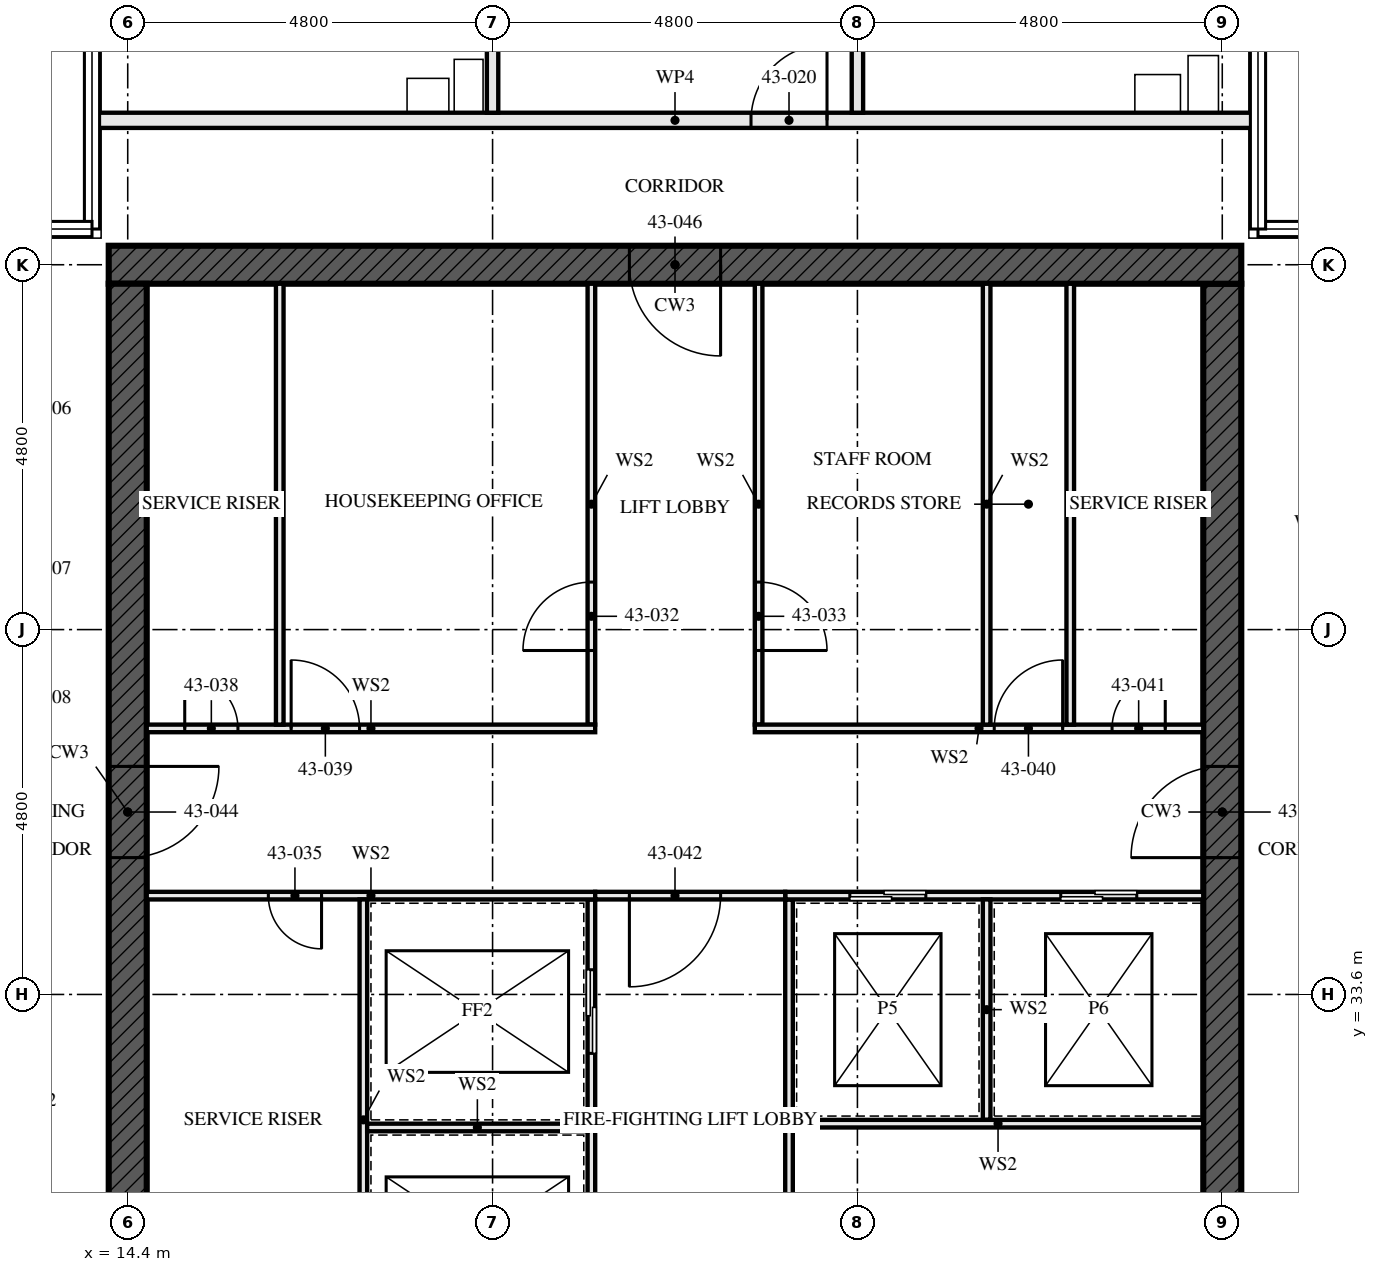
"""IFC4 building model, lengths in metres.
Left out: names, types, materials, properties, quantities, classifications, styles, units other than length and angle.
Written with IfcOpenShell. Run it as: python <this file> out.ifc"""

import sys

from ifc_helpers import new_model, si_unit, direction, frame, frame_2d, origin, place, context, subcontext, project, spatial, rectangle, extrude, element, fill, save


model = new_model("IFC4")
c1 = context("Model", 3, precision=1e-05, world=origin(), true_north=direction((0.0, 1.0)))
c2 = subcontext(c1, "Body", "Model", "MODEL_VIEW")
j1 = project(units=[si_unit("LENGTHUNIT", "METRE"), si_unit("PLANEANGLEUNIT", "RADIAN")], contexts=[c1])
p1 = place(None, origin())
s1 = spatial("IfcSite", under=j1, at=p1, CompositionType="ELEMENT")
p2 = place(p1, origin())
s2 = spatial("IfcBuilding", under=s1, at=p2, CompositionType="ELEMENT")
p3 = place(p2, frame((0.0, 0.0, 158.5)))
s3 = spatial("IfcBuildingStorey", under=s2, at=p3, CompositionType="ELEMENT", Elevation=158.5)
p4 = place(p3, frame((29.05, 43.2, -0.17), z_axis=(0.0, 0.0, 1.0), x_axis=(-1.0, 0.0, 0.0)))
e1 = element("IfcWall", 1, at=p4, inside=s3, PredefinedType="SHEAR", context=c2, shape_type="SweptSolid", body=[
    extrude(rectangle(XDim=14.9, YDim=0.5, at=frame_2d((7.45, 0.0))), origin(), (0.0, 0.0, 1.0), 3.5),
])
p5 = place(p4, frame((6.85, 0.0, 0.17)))
e2 = element("IfcOpeningElement", 2, at=p5, cuts=e1, PredefinedType="OPENING", context=c2, shape_type="SweptSolid", body=[
    extrude(rectangle(XDim=1.2, YDim=2.1, at=frame_2d((0.6, 1.05))), frame((0.0, 0.26, 0.0), z_axis=(0.0, -1.0, 0.0), x_axis=(1.0, 0.0, 0.0)), (0.0, 0.0, 1.0), 0.521),
])
p6 = place(p3, frame((14.4, 42.95, -0.17), z_axis=(0.0, 0.0, 1.0), x_axis=(0.0, -1.0, 0.0)))
e3 = element("IfcWall", 3, at=p6, inside=s3, PredefinedType="SHEAR", context=c2, shape_type="SweptSolid", body=[
    extrude(rectangle(XDim=13.9, YDim=0.5, at=frame_2d((6.95, 0.0))), origin(), (0.0, 0.0, 1.0), 3.5),
])
p7 = place(p6, frame((6.35, 0.0, 0.17)))
e4 = element("IfcOpeningElement", 4, at=p7, cuts=e3, PredefinedType="OPENING", context=c2, shape_type="SweptSolid", body=[
    extrude(rectangle(XDim=1.2, YDim=2.1, at=frame_2d((0.6, 1.05))), frame((0.0, 0.26, 0.0), z_axis=(0.0, -1.0, 0.0), x_axis=(1.0, 0.0, 0.0)), (0.0, 0.0, 1.0), 0.521),
])
p8 = place(p3, frame((28.8, 29.05, -0.17), z_axis=(0.0, 0.0, 1.0), x_axis=(0.0, 1.0, 0.0)))
e5 = element("IfcWall", 5, at=p8, inside=s3, PredefinedType="SHEAR", context=c2, shape_type="SweptSolid", body=[
    extrude(rectangle(XDim=13.9, YDim=0.5, at=frame_2d((6.95, 0.0))), origin(), (0.0, 0.0, 1.0), 3.5),
])
p9 = place(p8, frame((6.35, 0.0, 0.17)))
e6 = element("IfcOpeningElement", 6, at=p9, cuts=e5, PredefinedType="OPENING", context=c2, shape_type="SweptSolid", body=[
    extrude(rectangle(XDim=1.2, YDim=2.1, at=frame_2d((0.6, 1.05))), frame((0.0, 0.26, 0.0), z_axis=(0.0, -1.0, 0.0), x_axis=(1.0, 0.0, 0.0)), (0.0, 0.0, 1.0), 0.521),
])
p10 = place(p3, frame((24.0, 48.2, 0.0), z_axis=(0.0, 0.0, 1.0), x_axis=(0.0, -1.0, 0.0)))
e7 = element("IfcWall", 7, at=p10, inside=s3, PredefinedType="PARTITIONING", context=c2, shape_type="SweptSolid", body=[
    extrude(rectangle(XDim=3.0, YDim=0.15, at=frame_2d((1.5, 0.0))), origin(), (0.0, 0.0, 1.0), 2.55),
])
p11 = place(p10, frame((1.05, 0.0, 0.0)))
e8 = element("IfcOpeningElement", 8, at=p11, cuts=e7, PredefinedType="OPENING", context=c2, shape_type="SweptSolid", body=[
    extrude(rectangle(XDim=0.9, YDim=2.1, at=frame_2d((0.45, 1.05))), frame((0.0, 0.085, 0.0), z_axis=(0.0, -1.0, 0.0), x_axis=(1.0, 0.0, 0.0)), (0.0, 0.0, 1.0), 0.171),
])
p12 = place(p3, frame((19.2, 48.2, 0.0), z_axis=(0.0, 0.0, 1.0), x_axis=(0.0, -1.0, 0.0)))
e9 = element("IfcWall", 9, at=p12, inside=s3, PredefinedType="PARTITIONING", context=c2, shape_type="SweptSolid", body=[
    extrude(rectangle(XDim=3.0, YDim=0.15, at=frame_2d((1.5, 0.0))), origin(), (0.0, 0.0, 1.0), 2.55),
])
p13 = place(p12, frame((1.05, 0.0, 0.0)))
e10 = element("IfcOpeningElement", 10, at=p13, cuts=e9, PredefinedType="OPENING", context=c2, shape_type="SweptSolid", body=[
    extrude(rectangle(XDim=0.9, YDim=2.1, at=frame_2d((0.45, 1.05))), frame((0.0, 0.085, 0.0), z_axis=(0.0, -1.0, 0.0), x_axis=(1.0, 0.0, 0.0)), (0.0, 0.0, 1.0), 0.171),
])
p14 = place(p3, frame((29.25, 45.1, 0.0), z_axis=(0.0, 0.0, 1.0), x_axis=(-1.0, 0.0, 0.0)))
e11 = element("IfcWall", 11, at=p14, inside=s3, PredefinedType="PARTITIONING", context=c2, shape_type="SweptSolid", body=[
    extrude(rectangle(XDim=15.3, YDim=0.2, at=frame_2d((7.65, 0.0))), origin(), (0.0, 0.0, 1.0), 2.32),
])
p15 = place(p14, frame((5.65, 0.0, 0.0)))
e12 = element("IfcOpeningElement", 12, at=p15, cuts=e11, PredefinedType="OPENING", context=c2, shape_type="SweptSolid", body=[
    extrude(rectangle(XDim=1.0, YDim=2.1, at=frame_2d((0.5, 1.05))), frame((0.0, 0.111, 0.0), z_axis=(0.0, -1.0, 0.0), x_axis=(1.0, 0.0, 0.0)), (0.0, 0.0, 1.0), 0.221),
])
for number, where, z_axis, x_axis in (
    (13, (16.4, 37.15, 0.0), (0.0, 0.0, 1.0), (0.0, 1.0, 0.0)),
    (14, (26.8, 37.15, 0.0), (0.0, 0.0, 1.0), (0.0, 1.0, 0.0)),
):
    element("IfcWall", number, at=place(p3, frame(where, z_axis=z_axis, x_axis=x_axis)), inside=s3, PredefinedType="SOLIDWALL", context=c2, shape_type="SweptSolid", body=[
        extrude(rectangle(XDim=5.8, YDim=0.1, at=frame_2d((2.9, 0.0))), origin(), (0.0, 0.0, 1.0), 3.33),
    ])
p16 = place(p3, frame((20.5, 29.05, 0.0), z_axis=(0.0, 0.0, 1.0), x_axis=(0.0, 1.0, 0.0)))
e15 = element("IfcWall", 15, at=p16, inside=s3, PredefinedType="SOLIDWALL", context=c2, shape_type="SweptSolid", body=[
    extrude(rectangle(XDim=5.8, YDim=0.1, at=frame_2d((2.9, 0.0))), origin(), (0.0, 0.0, 1.0), 3.33),
])
p17 = place(p16, frame((0.8, 0.0, 0.0)))
e16 = element("IfcOpeningElement", 16, at=p17, cuts=e15, PredefinedType="OPENING", context=c2, shape_type="SweptSolid", body=[
    extrude(rectangle(XDim=1.1, YDim=2.3, at=frame_2d((0.55, 1.15))), frame((0.0, 0.061, 0.0), z_axis=(0.0, -1.0, 0.0), x_axis=(1.0, 0.0, 0.0)), (0.0, 0.0, 1.0), 0.121),
])
p18 = place(p16, frame((3.775, 0.0, 0.0)))
e17 = element("IfcOpeningElement", 17, at=p18, cuts=e15, PredefinedType="OPENING", context=c2, shape_type="SweptSolid", body=[
    extrude(rectangle(XDim=1.1, YDim=2.3, at=frame_2d((0.55, 1.15))), frame((0.0, 0.061, 0.0), z_axis=(0.0, -1.0, 0.0), x_axis=(1.0, 0.0, 0.0)), (0.0, 0.0, 1.0), 0.121),
])
p19 = place(p3, frame((20.5, 37.15, 0.0), z_axis=(0.0, 0.0, 1.0), x_axis=(0.0, 1.0, 0.0)))
e18 = element("IfcWall", 18, at=p19, inside=s3, PredefinedType="SOLIDWALL", context=c2, shape_type="SweptSolid", body=[
    extrude(rectangle(XDim=5.8, YDim=0.1, at=frame_2d((2.9, 0.0))), origin(), (0.0, 0.0, 1.0), 3.33),
])
p20 = place(p19, frame((0.975, 0.0, 0.0)))
e19 = element("IfcOpeningElement", 19, at=p20, cuts=e18, PredefinedType="OPENING", context=c2, shape_type="SweptSolid", body=[
    extrude(rectangle(XDim=0.9, YDim=2.1, at=frame_2d((0.45, 1.05))), frame((0.0, 0.061, 0.0), z_axis=(0.0, -1.0, 0.0), x_axis=(1.0, 0.0, 0.0)), (0.0, 0.0, 1.0), 0.121),
])
p21 = place(p3, frame((22.7, 37.15, 0.0), z_axis=(0.0, 0.0, 1.0), x_axis=(0.0, 1.0, 0.0)))
e20 = element("IfcWall", 20, at=p21, inside=s3, PredefinedType="SOLIDWALL", context=c2, shape_type="SweptSolid", body=[
    extrude(rectangle(XDim=5.8, YDim=0.1, at=frame_2d((2.9, 0.0))), origin(), (0.0, 0.0, 1.0), 3.33),
])
p22 = place(p21, frame((0.975, 0.0, 0.0)))
e21 = element("IfcOpeningElement", 21, at=p22, cuts=e20, PredefinedType="OPENING", context=c2, shape_type="SweptSolid", body=[
    extrude(rectangle(XDim=0.9, YDim=2.1, at=frame_2d((0.45, 1.05))), frame((0.0, 0.061, 0.0), z_axis=(0.0, -1.0, 0.0), x_axis=(1.0, 0.0, 0.0)), (0.0, 0.0, 1.0), 0.121),
])
p23 = place(p3, frame((23.1, 29.05, 0.0), z_axis=(0.0, 0.0, 1.0), x_axis=(0.0, 1.0, 0.0)))
e22 = element("IfcWall", 22, at=p23, inside=s3, PredefinedType="SOLIDWALL", context=c2, shape_type="SweptSolid", body=[
    extrude(rectangle(XDim=5.8, YDim=0.1, at=frame_2d((2.9, 0.0))), origin(), (0.0, 0.0, 1.0), 3.33),
])
p24 = place(p23, frame((1.0, 0.0, 0.0)))
e23 = element("IfcOpeningElement", 23, at=p24, cuts=e22, PredefinedType="OPENING", context=c2, shape_type="SweptSolid", body=[
    extrude(rectangle(XDim=0.7, YDim=2.1, at=frame_2d((0.35, 1.05))), frame((0.0, 0.061, 0.0), z_axis=(0.0, -1.0, 0.0), x_axis=(1.0, 0.0, 0.0)), (0.0, 0.0, 1.0), 0.121),
])
p25 = place(p3, frame((14.65, 34.9, 0.0), z_axis=(0.0, 0.0, 1.0), x_axis=(1.0, 0.0, 0.0)))
e24 = element("IfcWall", 24, at=p25, inside=s3, PredefinedType="SOLIDWALL", context=c2, shape_type="SweptSolid", body=[
    extrude(rectangle(XDim=5.9, YDim=0.1, at=frame_2d((2.95, 0.0))), origin(), (0.0, 0.0, 1.0), 3.33),
])
p26 = place(p25, frame((1.6, 0.0, 0.0)))
e25 = element("IfcOpeningElement", 25, at=p26, cuts=e24, PredefinedType="OPENING", context=c2, shape_type="SweptSolid", body=[
    extrude(rectangle(XDim=0.7, YDim=2.1, at=frame_2d((0.35, 1.05))), frame((0.0, 0.061, 0.0), z_axis=(0.0, -1.0, 0.0), x_axis=(1.0, 0.0, 0.0)), (0.0, 0.0, 1.0), 0.121),
])
p27 = place(p3, frame((23.05, 34.9, 0.0), z_axis=(0.0, 0.0, 1.0), x_axis=(1.0, 0.0, 0.0)))
e26 = element("IfcWall", 26, at=p27, inside=s3, PredefinedType="SOLIDWALL", context=c2, shape_type="SweptSolid", body=[
    extrude(rectangle(XDim=5.5, YDim=0.1, at=frame_2d((2.75, 0.0))), origin(), (0.0, 0.0, 1.0), 3.33),
])
p28 = place(p27, frame((0.85, 0.0, 0.0)))
e27 = element("IfcOpeningElement", 27, at=p28, cuts=e26, PredefinedType="OPENING", context=c2, shape_type="SweptSolid", body=[
    extrude(rectangle(XDim=1.0, YDim=2.1, at=frame_2d((0.5, 1.05))), frame((0.0, 0.061, 0.0), z_axis=(0.0, -1.0, 0.0), x_axis=(1.0, 0.0, 0.0)), (0.0, 0.0, 1.0), 0.121),
])
p29 = place(p27, frame((3.625, 0.0, 0.0)))
e28 = element("IfcOpeningElement", 28, at=p29, cuts=e26, PredefinedType="OPENING", context=c2, shape_type="SweptSolid", body=[
    extrude(rectangle(XDim=1.0, YDim=2.1, at=frame_2d((0.5, 1.05))), frame((0.0, 0.061, 0.0), z_axis=(0.0, -1.0, 0.0), x_axis=(1.0, 0.0, 0.0)), (0.0, 0.0, 1.0), 0.121),
])
p30 = place(p3, frame((14.65, 37.1, 0.0), z_axis=(0.0, 0.0, 1.0), x_axis=(1.0, 0.0, 0.0)))
e29 = element("IfcWall", 29, at=p30, inside=s3, PredefinedType="SOLIDWALL", context=c2, shape_type="SweptSolid", body=[
    extrude(rectangle(XDim=5.9, YDim=0.1, at=frame_2d((2.95, 0.0))), origin(), (0.0, 0.0, 1.0), 3.33),
])
p31 = place(p30, frame((0.5, 0.0, 0.0)))
e30 = element("IfcOpeningElement", 30, at=p31, cuts=e29, PredefinedType="OPENING", context=c2, shape_type="SweptSolid", body=[
    extrude(rectangle(XDim=0.7, YDim=2.1, at=frame_2d((0.35, 1.05))), frame((0.0, 0.061, 0.0), z_axis=(0.0, -1.0, 0.0), x_axis=(1.0, 0.0, 0.0)), (0.0, 0.0, 1.0), 0.121),
])
p32 = place(p30, frame((1.9, 0.0, 0.0)))
e31 = element("IfcOpeningElement", 31, at=p32, cuts=e29, PredefinedType="OPENING", context=c2, shape_type="SweptSolid", body=[
    extrude(rectangle(XDim=0.9, YDim=2.1, at=frame_2d((0.45, 1.05))), frame((0.0, 0.061, 0.0), z_axis=(0.0, -1.0, 0.0), x_axis=(1.0, 0.0, 0.0)), (0.0, 0.0, 1.0), 0.121),
])
p33 = place(p3, frame((22.65, 37.1, 0.0), z_axis=(0.0, 0.0, 1.0), x_axis=(1.0, 0.0, 0.0)))
e32 = element("IfcWall", 32, at=p33, inside=s3, PredefinedType="SOLIDWALL", context=c2, shape_type="SweptSolid", body=[
    extrude(rectangle(XDim=5.9, YDim=0.1, at=frame_2d((2.95, 0.0))), origin(), (0.0, 0.0, 1.0), 3.33),
])
p34 = place(p33, frame((3.15, 0.0, 0.0)))
e33 = element("IfcOpeningElement", 33, at=p34, cuts=e32, PredefinedType="OPENING", context=c2, shape_type="SweptSolid", body=[
    extrude(rectangle(XDim=0.9, YDim=2.1, at=frame_2d((0.45, 1.05))), frame((0.0, 0.061, 0.0), z_axis=(0.0, -1.0, 0.0), x_axis=(1.0, 0.0, 0.0)), (0.0, 0.0, 1.0), 0.121),
])
p35 = place(p33, frame((4.7, 0.0, 0.0)))
e34 = element("IfcOpeningElement", 34, at=p35, cuts=e32, PredefinedType="OPENING", context=c2, shape_type="SweptSolid", body=[
    extrude(rectangle(XDim=0.7, YDim=2.1, at=frame_2d((0.35, 1.05))), frame((0.0, 0.061, 0.0), z_axis=(0.0, -1.0, 0.0), x_axis=(1.0, 0.0, 0.0)), (0.0, 0.0, 1.0), 0.121),
])
p36 = place(p3, frame((20.55, 34.9, 0.0), z_axis=(0.0, 0.0, 1.0), x_axis=(1.0, 0.0, 0.0)))
e35 = element("IfcWall", 35, at=p36, inside=s3, PredefinedType="SOLIDWALL", context=c2, shape_type="SweptSolid", body=[
    extrude(rectangle(XDim=2.5, YDim=0.1, at=frame_2d((1.25, 0.0))), origin(), (0.0, 0.0, 1.0), 3.33),
])
p37 = place(p36, frame((0.45, 0.0, 0.0)))
e36 = element("IfcOpeningElement", 36, at=p37, cuts=e35, PredefinedType="OPENING", context=c2, shape_type="SweptSolid", body=[
    extrude(rectangle(XDim=1.2, YDim=2.1, at=frame_2d((0.6, 1.05))), frame((0.0, 0.061, 0.0), z_axis=(0.0, -1.0, 0.0), x_axis=(1.0, 0.0, 0.0)), (0.0, 0.0, 1.0), 0.121),
])
p38 = place(p3, frame((17.5, 29.05, 0.0), z_axis=(0.0, 0.0, 1.0), x_axis=(0.0, 1.0, 0.0)))
e37 = element("IfcWall", 37, at=p38, inside=s3, PredefinedType="SOLIDWALL", context=c2, shape_type="SweptSolid", body=[
    extrude(rectangle(XDim=5.8, YDim=0.1, at=frame_2d((2.9, 0.0))), origin(), (0.0, 0.0, 1.0), 3.33),
])
p39 = place(p3, frame((17.55, 31.85, 0.0), z_axis=(0.0, 0.0, 1.0), x_axis=(1.0, 0.0, 0.0)))
e38 = element("IfcWall", 38, at=p39, inside=s3, PredefinedType="SOLIDWALL", context=c2, shape_type="SweptSolid", body=[
    extrude(rectangle(XDim=2.9, YDim=0.1, at=frame_2d((1.45, 0.0))), origin(), (0.0, 0.0, 1.0), 3.33),
])
p40 = place(p3, frame((25.7, 37.15, 0.0), z_axis=(0.0, 0.0, 1.0), x_axis=(0.0, 1.0, 0.0)))
e39 = element("IfcWall", 39, at=p40, inside=s3, PredefinedType="SOLIDWALL", context=c2, shape_type="SweptSolid", body=[
    extrude(rectangle(XDim=5.8, YDim=0.1, at=frame_2d((2.9, 0.0))), origin(), (0.0, 0.0, 1.0), 3.33),
])
p41 = place(p3, frame((25.7, 31.95, 0.0), z_axis=(0.0, 0.0, 1.0), x_axis=(0.0, 1.0, 0.0)))
e40 = element("IfcWall", 40, at=p41, inside=s3, PredefinedType="SOLIDWALL", context=c2, shape_type="SweptSolid", body=[
    extrude(rectangle(XDim=2.9, YDim=0.1, at=frame_2d((1.45, 0.0))), origin(), (0.0, 0.0, 1.0), 3.33),
])
p42 = place(p3, frame((23.15, 31.9, 0.0), z_axis=(0.0, 0.0, 1.0), x_axis=(1.0, 0.0, 0.0)))
e41 = element("IfcWall", 41, at=p42, inside=s3, PredefinedType="SOLIDWALL", context=c2, shape_type="SweptSolid", body=[
    extrude(rectangle(XDim=5.4, YDim=0.1, at=frame_2d((2.7, 0.0))), origin(), (0.0, 0.0, 1.0), 3.33),
])
p43 = place(p15, frame((1.0, 0.0, 0.0), z_axis=(0.0, 0.0, 1.0), x_axis=(-1.0, 0.0, 0.0)))
e42 = element("IfcDoor", 42, at=p43, inside=s3, OperationType="SINGLE_SWING_LEFT", PredefinedType="DOOR", context=c2, shape_type="SweptSolid", body=[
    extrude(rectangle(XDim=1.0, YDim=2.1, at=frame_2d((0.5, 1.05))), frame((0.0, 0.027, 0.0), z_axis=(0.0, -1.0, 0.0), x_axis=(1.0, 0.0, 0.0)), (0.0, 0.0, 1.0), 0.054),
])
fill(e12, e42)
p44 = place(p18, origin())
e43 = element("IfcDoor", 43, at=p44, inside=s3, OperationType="SLIDING_TO_LEFT", PredefinedType="DOOR", context=c2, shape_type="SweptSolid", body=[
    extrude(rectangle(XDim=1.1, YDim=2.3, at=frame_2d((0.55, 1.15))), frame((0.0, 0.05, 0.0), z_axis=(0.0, -1.0, 0.0), x_axis=(1.0, 0.0, 0.0)), (0.0, 0.0, 1.0), 0.1),
])
fill(e17, e43)
p45 = place(p20, origin())
e44 = element("IfcDoor", 44, at=p45, inside=s3, OperationType="SINGLE_SWING_RIGHT", PredefinedType="DOOR", context=c2, shape_type="SweptSolid", body=[
    extrude(rectangle(XDim=0.9, YDim=2.1, at=frame_2d((0.45, 1.05))), frame((0.0, 0.027, 0.0), z_axis=(0.0, -1.0, 0.0), x_axis=(1.0, 0.0, 0.0)), (0.0, 0.0, 1.0), 0.054),
])
fill(e19, e44)
p46 = place(p22, frame((0.9, 0.0, 0.0), z_axis=(0.0, 0.0, 1.0), x_axis=(-1.0, 0.0, 0.0)))
e45 = element("IfcDoor", 45, at=p46, inside=s3, OperationType="SINGLE_SWING_LEFT", PredefinedType="DOOR", context=c2, shape_type="SweptSolid", body=[
    extrude(rectangle(XDim=0.9, YDim=2.1, at=frame_2d((0.45, 1.05))), frame((0.0, 0.027, 0.0), z_axis=(0.0, -1.0, 0.0), x_axis=(1.0, 0.0, 0.0)), (0.0, 0.0, 1.0), 0.054),
])
fill(e21, e45)
p47 = place(p26, frame((0.7, 0.0, 0.0), z_axis=(0.0, 0.0, 1.0), x_axis=(-1.0, 0.0, 0.0)))
e46 = element("IfcDoor", 46, at=p47, inside=s3, OperationType="SINGLE_SWING_RIGHT", PredefinedType="DOOR", context=c2, shape_type="SweptSolid", body=[
    extrude(rectangle(XDim=0.7, YDim=2.1, at=frame_2d((0.35, 1.05))), frame((0.0, 0.027, 0.0), z_axis=(0.0, -1.0, 0.0), x_axis=(1.0, 0.0, 0.0)), (0.0, 0.0, 1.0), 0.054),
])
fill(e25, e46)
p48 = place(p28, origin())
e47 = element("IfcDoor", 47, at=p48, inside=s3, OperationType="SLIDING_TO_LEFT", PredefinedType="DOOR", context=c2, shape_type="SweptSolid", body=[
    extrude(rectangle(XDim=1.0, YDim=2.1, at=frame_2d((0.5, 1.05))), frame((0.0, 0.05, 0.0), z_axis=(0.0, -1.0, 0.0), x_axis=(1.0, 0.0, 0.0)), (0.0, 0.0, 1.0), 0.1),
])
fill(e27, e47)
p49 = place(p29, origin())
e48 = element("IfcDoor", 48, at=p49, inside=s3, OperationType="SLIDING_TO_LEFT", PredefinedType="DOOR", context=c2, shape_type="SweptSolid", body=[
    extrude(rectangle(XDim=1.0, YDim=2.1, at=frame_2d((0.5, 1.05))), frame((0.0, 0.05, 0.0), z_axis=(0.0, -1.0, 0.0), x_axis=(1.0, 0.0, 0.0)), (0.0, 0.0, 1.0), 0.1),
])
fill(e28, e48)
p50 = place(p31, origin())
e49 = element("IfcDoor", 49, at=p50, inside=s3, OperationType="SINGLE_SWING_RIGHT", PredefinedType="DOOR", context=c2, shape_type="SweptSolid", body=[
    extrude(rectangle(XDim=0.7, YDim=2.1, at=frame_2d((0.35, 1.05))), frame((0.0, 0.027, 0.0), z_axis=(0.0, -1.0, 0.0), x_axis=(1.0, 0.0, 0.0)), (0.0, 0.0, 1.0), 0.054),
])
fill(e30, e49)
p51 = place(p32, origin())
e50 = element("IfcDoor", 50, at=p51, inside=s3, OperationType="SINGLE_SWING_RIGHT", PredefinedType="DOOR", context=c2, shape_type="SweptSolid", body=[
    extrude(rectangle(XDim=0.9, YDim=2.1, at=frame_2d((0.45, 1.05))), frame((0.0, 0.027, 0.0), z_axis=(0.0, -1.0, 0.0), x_axis=(1.0, 0.0, 0.0)), (0.0, 0.0, 1.0), 0.054),
])
fill(e31, e50)
p52 = place(p34, origin())
e51 = element("IfcDoor", 51, at=p52, inside=s3, OperationType="SINGLE_SWING_LEFT", PredefinedType="DOOR", context=c2, shape_type="SweptSolid", body=[
    extrude(rectangle(XDim=0.9, YDim=2.1, at=frame_2d((0.45, 1.05))), frame((0.0, 0.027, 0.0), z_axis=(0.0, -1.0, 0.0), x_axis=(1.0, 0.0, 0.0)), (0.0, 0.0, 1.0), 0.054),
])
fill(e33, e51)
p53 = place(p35, origin())
e52 = element("IfcDoor", 52, at=p53, inside=s3, OperationType="SINGLE_SWING_LEFT", PredefinedType="DOOR", context=c2, shape_type="SweptSolid", body=[
    extrude(rectangle(XDim=0.7, YDim=2.1, at=frame_2d((0.35, 1.05))), frame((0.0, 0.027, 0.0), z_axis=(0.0, -1.0, 0.0), x_axis=(1.0, 0.0, 0.0)), (0.0, 0.0, 1.0), 0.054),
])
fill(e34, e52)
p54 = place(p37, frame((1.2, 0.0, 0.0), z_axis=(0.0, 0.0, 1.0), x_axis=(-1.0, 0.0, 0.0)))
e53 = element("IfcDoor", 53, at=p54, inside=s3, OperationType="SINGLE_SWING_LEFT", PredefinedType="DOOR", context=c2, shape_type="SweptSolid", body=[
    extrude(rectangle(XDim=1.2, YDim=2.1, at=frame_2d((0.6, 1.05))), frame((0.0, 0.027, 0.0), z_axis=(0.0, -1.0, 0.0), x_axis=(1.0, 0.0, 0.0)), (0.0, 0.0, 1.0), 0.054),
])
fill(e36, e53)
p55 = place(p7, origin())
e54 = element("IfcDoor", 54, at=p55, inside=s3, OperationType="SINGLE_SWING_LEFT", PredefinedType="DOOR", context=c2, shape_type="SweptSolid", body=[
    extrude(rectangle(XDim=1.2, YDim=2.1, at=frame_2d((0.6, 1.05))), frame((0.0, 0.027, 0.0), z_axis=(0.0, -1.0, 0.0), x_axis=(1.0, 0.0, 0.0)), (0.0, 0.0, 1.0), 0.054),
])
fill(e4, e54)
p56 = place(p9, origin())
e55 = element("IfcDoor", 55, at=p56, inside=s3, OperationType="SINGLE_SWING_LEFT", PredefinedType="DOOR", context=c2, shape_type="SweptSolid", body=[
    extrude(rectangle(XDim=1.2, YDim=2.1, at=frame_2d((0.6, 1.05))), frame((0.0, 0.027, 0.0), z_axis=(0.0, -1.0, 0.0), x_axis=(1.0, 0.0, 0.0)), (0.0, 0.0, 1.0), 0.054),
])
fill(e6, e55)
p57 = place(p5, origin())
e56 = element("IfcDoor", 56, at=p57, inside=s3, OperationType="SINGLE_SWING_LEFT", PredefinedType="DOOR", context=c2, shape_type="SweptSolid", body=[
    extrude(rectangle(XDim=1.2, YDim=2.1, at=frame_2d((0.6, 1.05))), frame((0.0, 0.027, 0.0), z_axis=(0.0, -1.0, 0.0), x_axis=(1.0, 0.0, 0.0)), (0.0, 0.0, 1.0), 0.054),
])
fill(e2, e56)
save(model, sys.argv[1])
